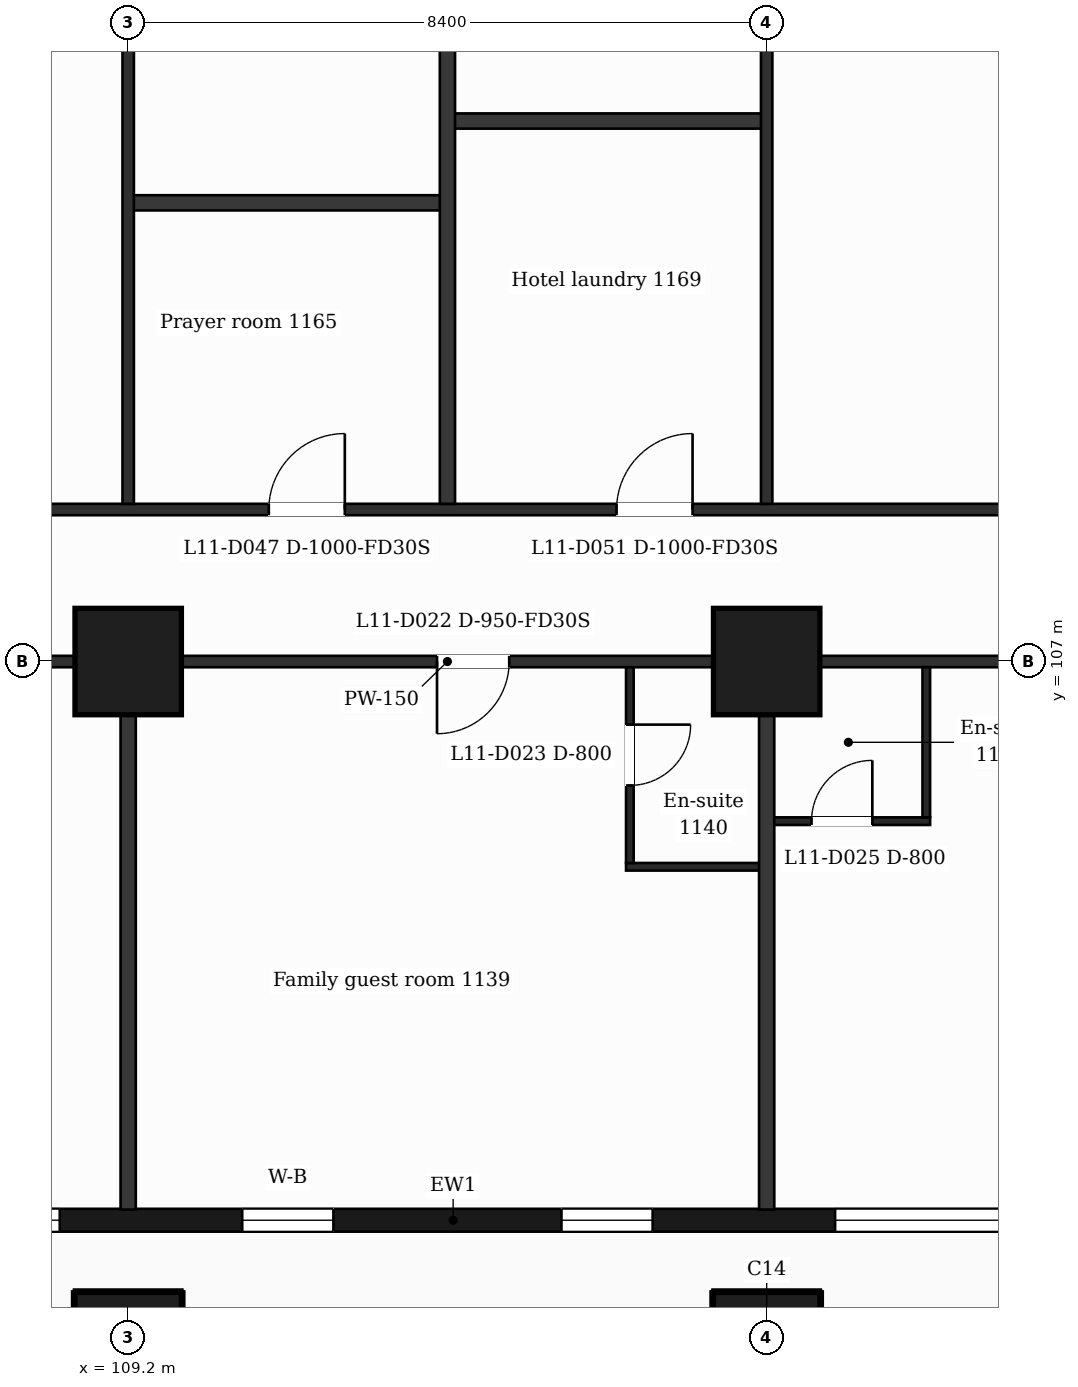
"""IFC4 building model, lengths in metres.
Left out: names, types, materials, properties, quantities, classifications, styles, units other than length and angle.
Written with IfcOpenShell. Run it as: python <this file> out.ifc"""

import sys

from ifc_helpers import new_model, si_unit, direction, frame, frame_2d, origin, origin_2d, place, context, subcontext, project, spatial, rectangle, extrude, element, fill, save


model = new_model("IFC4")
c1 = context("Model", 3, precision=1e-05, world=origin(), true_north=direction((0.0, 1.0)))
c2 = subcontext(c1, "Body", "Model", "MODEL_VIEW")
j1 = project(units=[si_unit("LENGTHUNIT", "METRE"), si_unit("PLANEANGLEUNIT", "RADIAN")], contexts=[c1])
p1 = place(None, origin())
s1 = spatial("IfcSite", under=j1, at=p1, CompositionType="ELEMENT")
p2 = place(p1, origin())
s2 = spatial("IfcBuilding", under=s1, at=p2, CompositionType="ELEMENT")
p3 = place(p2, frame((0.0, 0.0, 56.5)))
s3 = spatial("IfcBuildingStorey", under=s2, at=p3, CompositionType="ELEMENT", Elevation=56.5)
for number, where, z_axis, x_axis in (
    (1, (109.2, 98.0, 0.0), (0.0, 0.0, 1.0), (1.0, 0.0, 0.0)),
    (2, (117.6, 98.0, 0.0), (0.0, 0.0, 1.0), (1.0, 0.0, 0.0)),
    (3, (109.2, 107.0, 0.0), (0.0, 0.0, 1.0), (1.0, 0.0, 0.0)),
    (4, (117.6, 107.0, 0.0), (0.0, 0.0, 1.0), (1.0, 0.0, 0.0)),
):
    element("IfcColumn", number, at=place(p3, frame(where, z_axis=z_axis, x_axis=x_axis)), inside=s3, PredefinedType="COLUMN", context=c2, shape_type="SweptSolid", body=[
        extrude(rectangle(XDim=1.4, YDim=1.4, at=origin_2d()), origin(), (0.0, 0.0, 1.0), 3.5),
    ])
p4 = place(p3, frame((89.85, 99.65, 0.0), z_axis=(0.0, 0.0, 1.0), x_axis=(1.0, 0.0, 0.0)))
e5 = element("IfcWall", 5, at=p4, inside=s3, PredefinedType="SOLIDWALL", context=c2, shape_type="SweptSolid", body=[
    extrude(rectangle(XDim=47.25, YDim=0.3, at=frame_2d((23.625, 0.0))), origin(), (0.0, 0.0, 1.0), 3.18),
])
p5 = place(p4, frame((0.725, 0.0, 0.9)))
e6 = element("IfcOpeningElement", 6, at=p5, cuts=e5, PredefinedType="OPENING", context=c2, shape_type="SweptSolid", body=[
    extrude(rectangle(XDim=1.2, YDim=2.1, at=frame_2d((0.6, 1.05))), frame((0.0, 0.16, 0.0), z_axis=(0.0, -1.0, 0.0), x_axis=(1.0, 0.0, 0.0)), (0.0, 0.0, 1.0), 0.32),
])
p6 = place(p4, frame((3.45, 0.0, 0.9)))
e7 = element("IfcOpeningElement", 7, at=p6, cuts=e5, PredefinedType="OPENING", context=c2, shape_type="SweptSolid", body=[
    extrude(rectangle(XDim=2.4, YDim=2.1, at=frame_2d((1.2, 1.05))), frame((0.0, 0.16, 0.0), z_axis=(0.0, -1.0, 0.0), x_axis=(1.0, 0.0, 0.0)), (0.0, 0.0, 1.0), 0.32),
])
p7 = place(p4, frame((7.35, 0.0, 0.0)))
e8 = element("IfcOpeningElement", 8, at=p7, cuts=e5, PredefinedType="OPENING", context=c2, shape_type="SweptSolid", body=[
    extrude(rectangle(XDim=1.2, YDim=2.4, at=frame_2d((0.6, 1.2))), frame((0.0, 0.16, 0.0), z_axis=(0.0, -1.0, 0.0), x_axis=(1.0, 0.0, 0.0)), (0.0, 0.0, 1.0), 0.32),
])
p8 = place(p4, frame((9.15, 0.0, 0.9)))
e9 = element("IfcOpeningElement", 9, at=p8, cuts=e5, PredefinedType="OPENING", context=c2, shape_type="SweptSolid", body=[
    extrude(rectangle(XDim=1.2, YDim=2.1, at=frame_2d((0.6, 1.05))), frame((0.0, 0.16, 0.0), z_axis=(0.0, -1.0, 0.0), x_axis=(1.0, 0.0, 0.0)), (0.0, 0.0, 1.0), 0.32),
])
p9 = place(p4, frame((11.85, 0.0, 0.9)))
e10 = element("IfcOpeningElement", 10, at=p9, cuts=e5, PredefinedType="OPENING", context=c2, shape_type="SweptSolid", body=[
    extrude(rectangle(XDim=2.4, YDim=2.1, at=frame_2d((1.2, 1.05))), frame((0.0, 0.16, 0.0), z_axis=(0.0, -1.0, 0.0), x_axis=(1.0, 0.0, 0.0)), (0.0, 0.0, 1.0), 0.32),
])
p10 = place(p4, frame((16.05, 0.0, 0.9)))
e11 = element("IfcOpeningElement", 11, at=p10, cuts=e5, PredefinedType="OPENING", context=c2, shape_type="SweptSolid", body=[
    extrude(rectangle(XDim=2.4, YDim=2.1, at=frame_2d((1.2, 1.05))), frame((0.0, 0.16, 0.0), z_axis=(0.0, -1.0, 0.0), x_axis=(1.0, 0.0, 0.0)), (0.0, 0.0, 1.0), 0.32),
])
p11 = place(p4, frame((20.85, 0.0, 0.9)))
e12 = element("IfcOpeningElement", 12, at=p11, cuts=e5, PredefinedType="OPENING", context=c2, shape_type="SweptSolid", body=[
    extrude(rectangle(XDim=1.2, YDim=2.1, at=frame_2d((0.6, 1.05))), frame((0.0, 0.16, 0.0), z_axis=(0.0, -1.0, 0.0), x_axis=(1.0, 0.0, 0.0)), (0.0, 0.0, 1.0), 0.32),
])
p12 = place(p4, frame((25.05, 0.0, 0.9)))
e13 = element("IfcOpeningElement", 13, at=p12, cuts=e5, PredefinedType="OPENING", context=c2, shape_type="SweptSolid", body=[
    extrude(rectangle(XDim=1.2, YDim=2.1, at=frame_2d((0.6, 1.05))), frame((0.0, 0.16, 0.0), z_axis=(0.0, -1.0, 0.0), x_axis=(1.0, 0.0, 0.0)), (0.0, 0.0, 1.0), 0.32),
])
p13 = place(p4, frame((28.65, 0.0, 0.9)))
e14 = element("IfcOpeningElement", 14, at=p13, cuts=e5, PredefinedType="OPENING", context=c2, shape_type="SweptSolid", body=[
    extrude(rectangle(XDim=2.4, YDim=2.1, at=frame_2d((1.2, 1.05))), frame((0.0, 0.16, 0.0), z_axis=(0.0, -1.0, 0.0), x_axis=(1.0, 0.0, 0.0)), (0.0, 0.0, 1.0), 0.32),
])
p14 = place(p4, frame((32.85, 0.0, 0.9)))
e15 = element("IfcOpeningElement", 15, at=p14, cuts=e5, PredefinedType="OPENING", context=c2, shape_type="SweptSolid", body=[
    extrude(rectangle(XDim=2.4, YDim=2.1, at=frame_2d((1.2, 1.05))), frame((0.0, 0.16, 0.0), z_axis=(0.0, -1.0, 0.0), x_axis=(1.0, 0.0, 0.0)), (0.0, 0.0, 1.0), 0.32),
])
p15 = place(p4, frame((37.05, 0.0, 0.9)))
e16 = element("IfcOpeningElement", 16, at=p15, cuts=e5, PredefinedType="OPENING", context=c2, shape_type="SweptSolid", body=[
    extrude(rectangle(XDim=2.4, YDim=2.1, at=frame_2d((1.2, 1.05))), frame((0.0, 0.16, 0.0), z_axis=(0.0, -1.0, 0.0), x_axis=(1.0, 0.0, 0.0)), (0.0, 0.0, 1.0), 0.32),
])
p16 = place(p4, frame((41.25, 0.0, 0.9)))
e17 = element("IfcOpeningElement", 17, at=p16, cuts=e5, PredefinedType="OPENING", context=c2, shape_type="SweptSolid", body=[
    extrude(rectangle(XDim=2.4, YDim=2.1, at=frame_2d((1.2, 1.05))), frame((0.0, 0.16, 0.0), z_axis=(0.0, -1.0, 0.0), x_axis=(1.0, 0.0, 0.0)), (0.0, 0.0, 1.0), 0.32),
])
p17 = place(p4, frame((45.25, 0.0, 0.9)))
e18 = element("IfcOpeningElement", 18, at=p17, cuts=e5, PredefinedType="OPENING", context=c2, shape_type="SweptSolid", body=[
    extrude(rectangle(XDim=1.2, YDim=2.1, at=frame_2d((0.6, 1.05))), frame((0.0, 0.16, 0.0), z_axis=(0.0, -1.0, 0.0), x_axis=(1.0, 0.0, 0.0)), (0.0, 0.0, 1.0), 0.32),
])
p18 = place(p3, frame((115.75, 104.3, 0.0), z_axis=(0.0, 0.0, 1.0), x_axis=(1.0, 0.0, 0.0)))
e19 = element("IfcWall", 19, at=p18, inside=s3, PredefinedType="PARTITIONING", context=c2, shape_type="SweptSolid", body=[
    extrude(rectangle(XDim=1.85, YDim=0.1, at=frame_2d((0.925, 0.0))), origin(), (0.0, 0.0, 1.0), 3.18),
])
p19 = place(p3, frame((117.6, 104.9, 0.0), z_axis=(0.0, 0.0, 1.0), x_axis=(1.0, 0.0, 0.0)))
e20 = element("IfcWall", 20, at=p19, inside=s3, PredefinedType="PARTITIONING", context=c2, shape_type="SweptSolid", body=[
    extrude(rectangle(XDim=2.15, YDim=0.1, at=frame_2d((1.075, 0.0))), origin(), (0.0, 0.0, 1.0), 3.18),
])
p20 = place(p19, frame((0.59, 0.0, 0.0)))
e21 = element("IfcOpeningElement", 21, at=p20, cuts=e20, PredefinedType="OPENING", context=c2, shape_type="SweptSolid", body=[
    extrude(rectangle(XDim=0.8, YDim=2.1, at=frame_2d((0.4, 1.05))), frame((0.0, 0.06, 0.0), z_axis=(0.0, -1.0, 0.0), x_axis=(1.0, 0.0, 0.0)), (0.0, 0.0, 1.0), 0.12),
])
p21 = place(p3, frame((87.018, 107.0, 0.0), z_axis=(0.0, 0.0, 1.0), x_axis=(1.0, 0.0, 0.0)))
e22 = element("IfcWall", 22, at=p21, inside=s3, PredefinedType="PARTITIONING", context=c2, shape_type="SweptSolid", body=[
    extrude(rectangle(XDim=52.765, YDim=0.15, at=frame_2d((26.382, 0.0))), origin(), (0.0, 0.0, 1.0), 3.18),
])
p22 = place(p21, frame((1.032, 0.0, 0.0)))
e23 = element("IfcOpeningElement", 23, at=p22, cuts=e22, PredefinedType="OPENING", context=c2, shape_type="SweptSolid", body=[
    extrude(rectangle(XDim=0.95, YDim=2.1, at=frame_2d((0.475, 1.05))), frame((0.0, 0.085, 0.0), z_axis=(0.0, -1.0, 0.0), x_axis=(1.0, 0.0, 0.0)), (0.0, 0.0, 1.0), 0.17),
])
p23 = place(p21, frame((6.894, 0.0, 0.0)))
e24 = element("IfcOpeningElement", 24, at=p23, cuts=e22, PredefinedType="OPENING", context=c2, shape_type="SweptSolid", body=[
    extrude(rectangle(XDim=0.95, YDim=2.1, at=frame_2d((0.475, 1.05))), frame((0.0, 0.085, 0.0), z_axis=(0.0, -1.0, 0.0), x_axis=(1.0, 0.0, 0.0)), (0.0, 0.0, 1.0), 0.17),
])
p24 = place(p21, frame((17.844, 0.0, 0.0)))
e25 = element("IfcOpeningElement", 25, at=p24, cuts=e22, PredefinedType="OPENING", context=c2, shape_type="SweptSolid", body=[
    extrude(rectangle(XDim=0.95, YDim=2.1, at=frame_2d((0.475, 1.05))), frame((0.0, 0.085, 0.0), z_axis=(0.0, -1.0, 0.0), x_axis=(1.0, 0.0, 0.0)), (0.0, 0.0, 1.0), 0.17),
])
p25 = place(p21, frame((26.245, 0.0, 0.0)))
e26 = element("IfcOpeningElement", 26, at=p25, cuts=e22, PredefinedType="OPENING", context=c2, shape_type="SweptSolid", body=[
    extrude(rectangle(XDim=0.95, YDim=2.1, at=frame_2d((0.475, 1.05))), frame((0.0, 0.085, 0.0), z_axis=(0.0, -1.0, 0.0), x_axis=(1.0, 0.0, 0.0)), (0.0, 0.0, 1.0), 0.17),
])
p26 = place(p21, frame((35.822, 0.0, 0.0)))
e27 = element("IfcOpeningElement", 27, at=p26, cuts=e22, PredefinedType="OPENING", context=c2, shape_type="SweptSolid", body=[
    extrude(rectangle(XDim=0.95, YDim=2.1, at=frame_2d((0.475, 1.05))), frame((0.0, 0.085, 0.0), z_axis=(0.0, -1.0, 0.0), x_axis=(1.0, 0.0, 0.0)), (0.0, 0.0, 1.0), 0.17),
])
p27 = place(p21, frame((42.302, 0.0, 0.0)))
e28 = element("IfcOpeningElement", 28, at=p27, cuts=e22, PredefinedType="OPENING", context=c2, shape_type="SweptSolid", body=[
    extrude(rectangle(XDim=0.95, YDim=2.1, at=frame_2d((0.475, 1.05))), frame((0.0, 0.085, 0.0), z_axis=(0.0, -1.0, 0.0), x_axis=(1.0, 0.0, 0.0)), (0.0, 0.0, 1.0), 0.17),
])
p28 = place(p21, frame((49.285, 0.0, 0.0)))
e29 = element("IfcOpeningElement", 29, at=p28, cuts=e22, PredefinedType="OPENING", context=c2, shape_type="SweptSolid", body=[
    extrude(rectangle(XDim=0.95, YDim=2.1, at=frame_2d((0.475, 1.05))), frame((0.0, 0.085, 0.0), z_axis=(0.0, -1.0, 0.0), x_axis=(1.0, 0.0, 0.0)), (0.0, 0.0, 1.0), 0.17),
])
p29 = place(p3, frame((100.725, 109.0, 0.0), z_axis=(0.0, 0.0, 1.0), x_axis=(1.0, 0.0, 0.0)))
e30 = element("IfcWall", 30, at=p29, inside=s3, PredefinedType="PARTITIONING", context=c2, shape_type="SweptSolid", body=[
    extrude(rectangle(XDim=25.35, YDim=0.15, at=frame_2d((12.675, 0.0))), origin(), (0.0, 0.0, 1.0), 3.18),
])
p30 = place(p29, frame((1.975, 0.0, 0.0)))
e31 = element("IfcOpeningElement", 31, at=p30, cuts=e30, PredefinedType="OPENING", context=c2, shape_type="SweptSolid", body=[
    extrude(rectangle(XDim=1.0, YDim=2.1, at=frame_2d((0.5, 1.05))), frame((0.0, 0.085, 0.0), z_axis=(0.0, -1.0, 0.0), x_axis=(1.0, 0.0, 0.0)), (0.0, 0.0, 1.0), 0.17),
])
p31 = place(p29, frame((10.325, 0.0, 0.0)))
e32 = element("IfcOpeningElement", 32, at=p31, cuts=e30, PredefinedType="OPENING", context=c2, shape_type="SweptSolid", body=[
    extrude(rectangle(XDim=1.0, YDim=2.1, at=frame_2d((0.5, 1.05))), frame((0.0, 0.085, 0.0), z_axis=(0.0, -1.0, 0.0), x_axis=(1.0, 0.0, 0.0)), (0.0, 0.0, 1.0), 0.17),
])
p32 = place(p29, frame((14.9, 0.0, 0.0)))
e33 = element("IfcOpeningElement", 33, at=p32, cuts=e30, PredefinedType="OPENING", context=c2, shape_type="SweptSolid", body=[
    extrude(rectangle(XDim=1.0, YDim=2.1, at=frame_2d((0.5, 1.05))), frame((0.0, 0.085, 0.0), z_axis=(0.0, -1.0, 0.0), x_axis=(1.0, 0.0, 0.0)), (0.0, 0.0, 1.0), 0.17),
])
p33 = place(p29, frame((22.685, 0.0, 0.0)))
e34 = element("IfcOpeningElement", 34, at=p33, cuts=e30, PredefinedType="OPENING", context=c2, shape_type="SweptSolid", body=[
    extrude(rectangle(XDim=1.0, YDim=2.1, at=frame_2d((0.5, 1.05))), frame((0.0, 0.085, 0.0), z_axis=(0.0, -1.0, 0.0), x_axis=(1.0, 0.0, 0.0)), (0.0, 0.0, 1.0), 0.17),
])
p34 = place(p3, frame((109.2, 113.035, 0.0), z_axis=(0.0, 0.0, 1.0), x_axis=(1.0, 0.0, 0.0)))
e35 = element("IfcWall", 35, at=p34, inside=s3, PredefinedType="PARTITIONING", context=c2, shape_type="SweptSolid", body=[
    extrude(rectangle(XDim=4.2, YDim=0.2, at=frame_2d((2.1, 0.0))), origin(), (0.0, 0.0, 1.0), 3.18),
])
p35 = place(p3, frame((113.4, 114.111, 0.0), z_axis=(0.0, 0.0, 1.0), x_axis=(1.0, 0.0, 0.0)))
e36 = element("IfcWall", 36, at=p35, inside=s3, PredefinedType="PARTITIONING", context=c2, shape_type="SweptSolid", body=[
    extrude(rectangle(XDim=4.2, YDim=0.2, at=frame_2d((2.1, 0.0))), origin(), (0.0, 0.0, 1.0), 3.18),
])
p36 = place(p3, frame((109.2, 99.79, 0.0), z_axis=(0.0, 0.0, 1.0), x_axis=(0.0, 1.0, 0.0)))
e37 = element("IfcWall", 37, at=p36, inside=s3, PredefinedType="PARTITIONING", context=c2, shape_type="SweptSolid", body=[
    extrude(rectangle(XDim=7.135, YDim=0.2, at=frame_2d((3.567, 0.0))), origin(), (0.0, 0.0, 1.0), 3.18),
])
p37 = place(p3, frame((109.2, 109.075, 0.0), z_axis=(0.0, 0.0, 1.0), x_axis=(0.0, 1.0, 0.0)))
e38 = element("IfcWall", 38, at=p37, inside=s3, PredefinedType="PARTITIONING", context=c2, shape_type="SweptSolid", body=[
    extrude(rectangle(XDim=13.3, YDim=0.15, at=frame_2d((6.65, 0.0))), origin(), (0.0, 0.0, 1.0), 3.18),
])
p38 = place(p37, frame((8.939, 0.0, 0.0)))
e39 = element("IfcOpeningElement", 39, at=p38, cuts=e38, PredefinedType="OPENING", context=c2, shape_type="SweptSolid", body=[
    extrude(rectangle(XDim=1.0, YDim=2.1, at=frame_2d((0.5, 1.05))), frame((0.0, 0.085, 0.0), z_axis=(0.0, -1.0, 0.0), x_axis=(1.0, 0.0, 0.0)), (0.0, 0.0, 1.0), 0.17),
])
p39 = place(p3, frame((113.4, 109.075, 0.0), z_axis=(0.0, 0.0, 1.0), x_axis=(0.0, 1.0, 0.0)))
e40 = element("IfcWall", 40, at=p39, inside=s3, PredefinedType="PARTITIONING", context=c2, shape_type="SweptSolid", body=[
    extrude(rectangle(XDim=13.3, YDim=0.2, at=frame_2d((6.65, 0.0))), origin(), (0.0, 0.0, 1.0), 3.18),
])
p40 = place(p3, frame((115.8, 104.35, 0.0), z_axis=(0.0, 0.0, 1.0), x_axis=(0.0, 1.0, 0.0)))
e41 = element("IfcWall", 41, at=p40, inside=s3, PredefinedType="PARTITIONING", context=c2, shape_type="SweptSolid", body=[
    extrude(rectangle(XDim=2.575, YDim=0.1, at=frame_2d((1.288, 0.0))), origin(), (0.0, 0.0, 1.0), 3.18),
])
p41 = place(p40, frame((1.02, 0.0, 0.0)))
e42 = element("IfcOpeningElement", 42, at=p41, cuts=e41, PredefinedType="OPENING", context=c2, shape_type="SweptSolid", body=[
    extrude(rectangle(XDim=0.8, YDim=2.1, at=frame_2d((0.4, 1.05))), frame((0.0, 0.06, 0.0), z_axis=(0.0, -1.0, 0.0), x_axis=(1.0, 0.0, 0.0)), (0.0, 0.0, 1.0), 0.12),
])
p42 = place(p3, frame((117.6, 99.79, 0.0), z_axis=(0.0, 0.0, 1.0), x_axis=(0.0, 1.0, 0.0)))
e43 = element("IfcWall", 43, at=p42, inside=s3, PredefinedType="PARTITIONING", context=c2, shape_type="SweptSolid", body=[
    extrude(rectangle(XDim=7.135, YDim=0.2, at=frame_2d((3.567, 0.0))), origin(), (0.0, 0.0, 1.0), 3.18),
])
p43 = place(p3, frame((117.6, 109.075, 0.0), z_axis=(0.0, 0.0, 1.0), x_axis=(0.0, 1.0, 0.0)))
e44 = element("IfcWall", 44, at=p43, inside=s3, PredefinedType="PARTITIONING", context=c2, shape_type="SweptSolid", body=[
    extrude(rectangle(XDim=13.3, YDim=0.15, at=frame_2d((6.65, 0.0))), origin(), (0.0, 0.0, 1.0), 3.18),
])
p44 = place(p43, frame((8.042, 0.0, 0.0)))
e45 = element("IfcOpeningElement", 45, at=p44, cuts=e44, PredefinedType="OPENING", context=c2, shape_type="SweptSolid", body=[
    extrude(rectangle(XDim=1.0, YDim=2.1, at=frame_2d((0.5, 1.05))), frame((0.0, 0.085, 0.0), z_axis=(0.0, -1.0, 0.0), x_axis=(1.0, 0.0, 0.0)), (0.0, 0.0, 1.0), 0.17),
])
p45 = place(p3, frame((119.7, 104.95, 0.0), z_axis=(0.0, 0.0, 1.0), x_axis=(0.0, 1.0, 0.0)))
e46 = element("IfcWall", 46, at=p45, inside=s3, PredefinedType="PARTITIONING", context=c2, shape_type="SweptSolid", body=[
    extrude(rectangle(XDim=1.975, YDim=0.1, at=frame_2d((0.988, 0.0))), origin(), (0.0, 0.0, 1.0), 3.18),
])
p46 = place(p10, origin())
e47 = element("IfcWindow", 47, at=p46, inside=s3, PartitioningType="SINGLE_PANEL", PredefinedType="WINDOW", context=c2, shape_type="SweptSolid", body=[
    extrude(rectangle(XDim=2.4, YDim=2.1, at=frame_2d((1.2, 1.05))), frame((0.0, 0.03, 0.0), z_axis=(0.0, -1.0, 0.0), x_axis=(1.0, 0.0, 0.0)), (0.0, 0.0, 1.0), 0.06),
])
fill(e11, e47)
p47 = place(p11, origin())
e48 = element("IfcWindow", 48, at=p47, inside=s3, PartitioningType="SINGLE_PANEL", PredefinedType="WINDOW", context=c2, shape_type="SweptSolid", body=[
    extrude(rectangle(XDim=1.2, YDim=2.1, at=frame_2d((0.6, 1.05))), frame((0.0, 0.03, 0.0), z_axis=(0.0, -1.0, 0.0), x_axis=(1.0, 0.0, 0.0)), (0.0, 0.0, 1.0), 0.06),
])
fill(e12, e48)
p48 = place(p12, origin())
e49 = element("IfcWindow", 49, at=p48, inside=s3, PartitioningType="SINGLE_PANEL", PredefinedType="WINDOW", context=c2, shape_type="SweptSolid", body=[
    extrude(rectangle(XDim=1.2, YDim=2.1, at=frame_2d((0.6, 1.05))), frame((0.0, 0.03, 0.0), z_axis=(0.0, -1.0, 0.0), x_axis=(1.0, 0.0, 0.0)), (0.0, 0.0, 1.0), 0.06),
])
fill(e13, e49)
p49 = place(p13, origin())
e50 = element("IfcWindow", 50, at=p49, inside=s3, PartitioningType="SINGLE_PANEL", PredefinedType="WINDOW", context=c2, shape_type="SweptSolid", body=[
    extrude(rectangle(XDim=2.4, YDim=2.1, at=frame_2d((1.2, 1.05))), frame((0.0, 0.03, 0.0), z_axis=(0.0, -1.0, 0.0), x_axis=(1.0, 0.0, 0.0)), (0.0, 0.0, 1.0), 0.06),
])
fill(e14, e50)
p50 = place(p25, origin())
e51 = element("IfcDoor", 51, at=p50, inside=s3, OperationType="SINGLE_SWING_LEFT", PredefinedType="DOOR", context=c2, shape_type="SweptSolid", body=[
    extrude(rectangle(XDim=0.95, YDim=2.1, at=frame_2d((0.475, 1.05))), frame((0.0, 0.025, 0.0), z_axis=(0.0, -1.0, 0.0), x_axis=(1.0, 0.0, 0.0)), (0.0, 0.0, 1.0), 0.05),
])
fill(e26, e51)
p51 = place(p41, origin())
e52 = element("IfcDoor", 52, at=p51, inside=s3, OperationType="SINGLE_SWING_RIGHT", PredefinedType="DOOR", context=c2, shape_type="SweptSolid", body=[
    extrude(rectangle(XDim=0.8, YDim=2.1, at=frame_2d((0.4, 1.05))), frame((0.0, 0.025, 0.0), z_axis=(0.0, -1.0, 0.0), x_axis=(1.0, 0.0, 0.0)), (0.0, 0.0, 1.0), 0.05),
])
fill(e42, e52)
p52 = place(p20, origin())
e53 = element("IfcDoor", 53, at=p52, inside=s3, OperationType="SINGLE_SWING_RIGHT", PredefinedType="DOOR", context=c2, shape_type="SweptSolid", body=[
    extrude(rectangle(XDim=0.8, YDim=2.1, at=frame_2d((0.4, 1.05))), frame((0.0, 0.025, 0.0), z_axis=(0.0, -1.0, 0.0), x_axis=(1.0, 0.0, 0.0)), (0.0, 0.0, 1.0), 0.05),
])
fill(e21, e53)
p53 = place(p31, origin())
e54 = element("IfcDoor", 54, at=p53, inside=s3, OperationType="SINGLE_SWING_RIGHT", PredefinedType="DOOR", context=c2, shape_type="SweptSolid", body=[
    extrude(rectangle(XDim=1.0, YDim=2.1, at=frame_2d((0.5, 1.05))), frame((0.0, 0.025, 0.0), z_axis=(0.0, -1.0, 0.0), x_axis=(1.0, 0.0, 0.0)), (0.0, 0.0, 1.0), 0.05),
])
fill(e32, e54)
p54 = place(p32, origin())
e55 = element("IfcDoor", 55, at=p54, inside=s3, OperationType="SINGLE_SWING_RIGHT", PredefinedType="DOOR", context=c2, shape_type="SweptSolid", body=[
    extrude(rectangle(XDim=1.0, YDim=2.1, at=frame_2d((0.5, 1.05))), frame((0.0, 0.025, 0.0), z_axis=(0.0, -1.0, 0.0), x_axis=(1.0, 0.0, 0.0)), (0.0, 0.0, 1.0), 0.05),
])
fill(e33, e55)
save(model, sys.argv[1])
